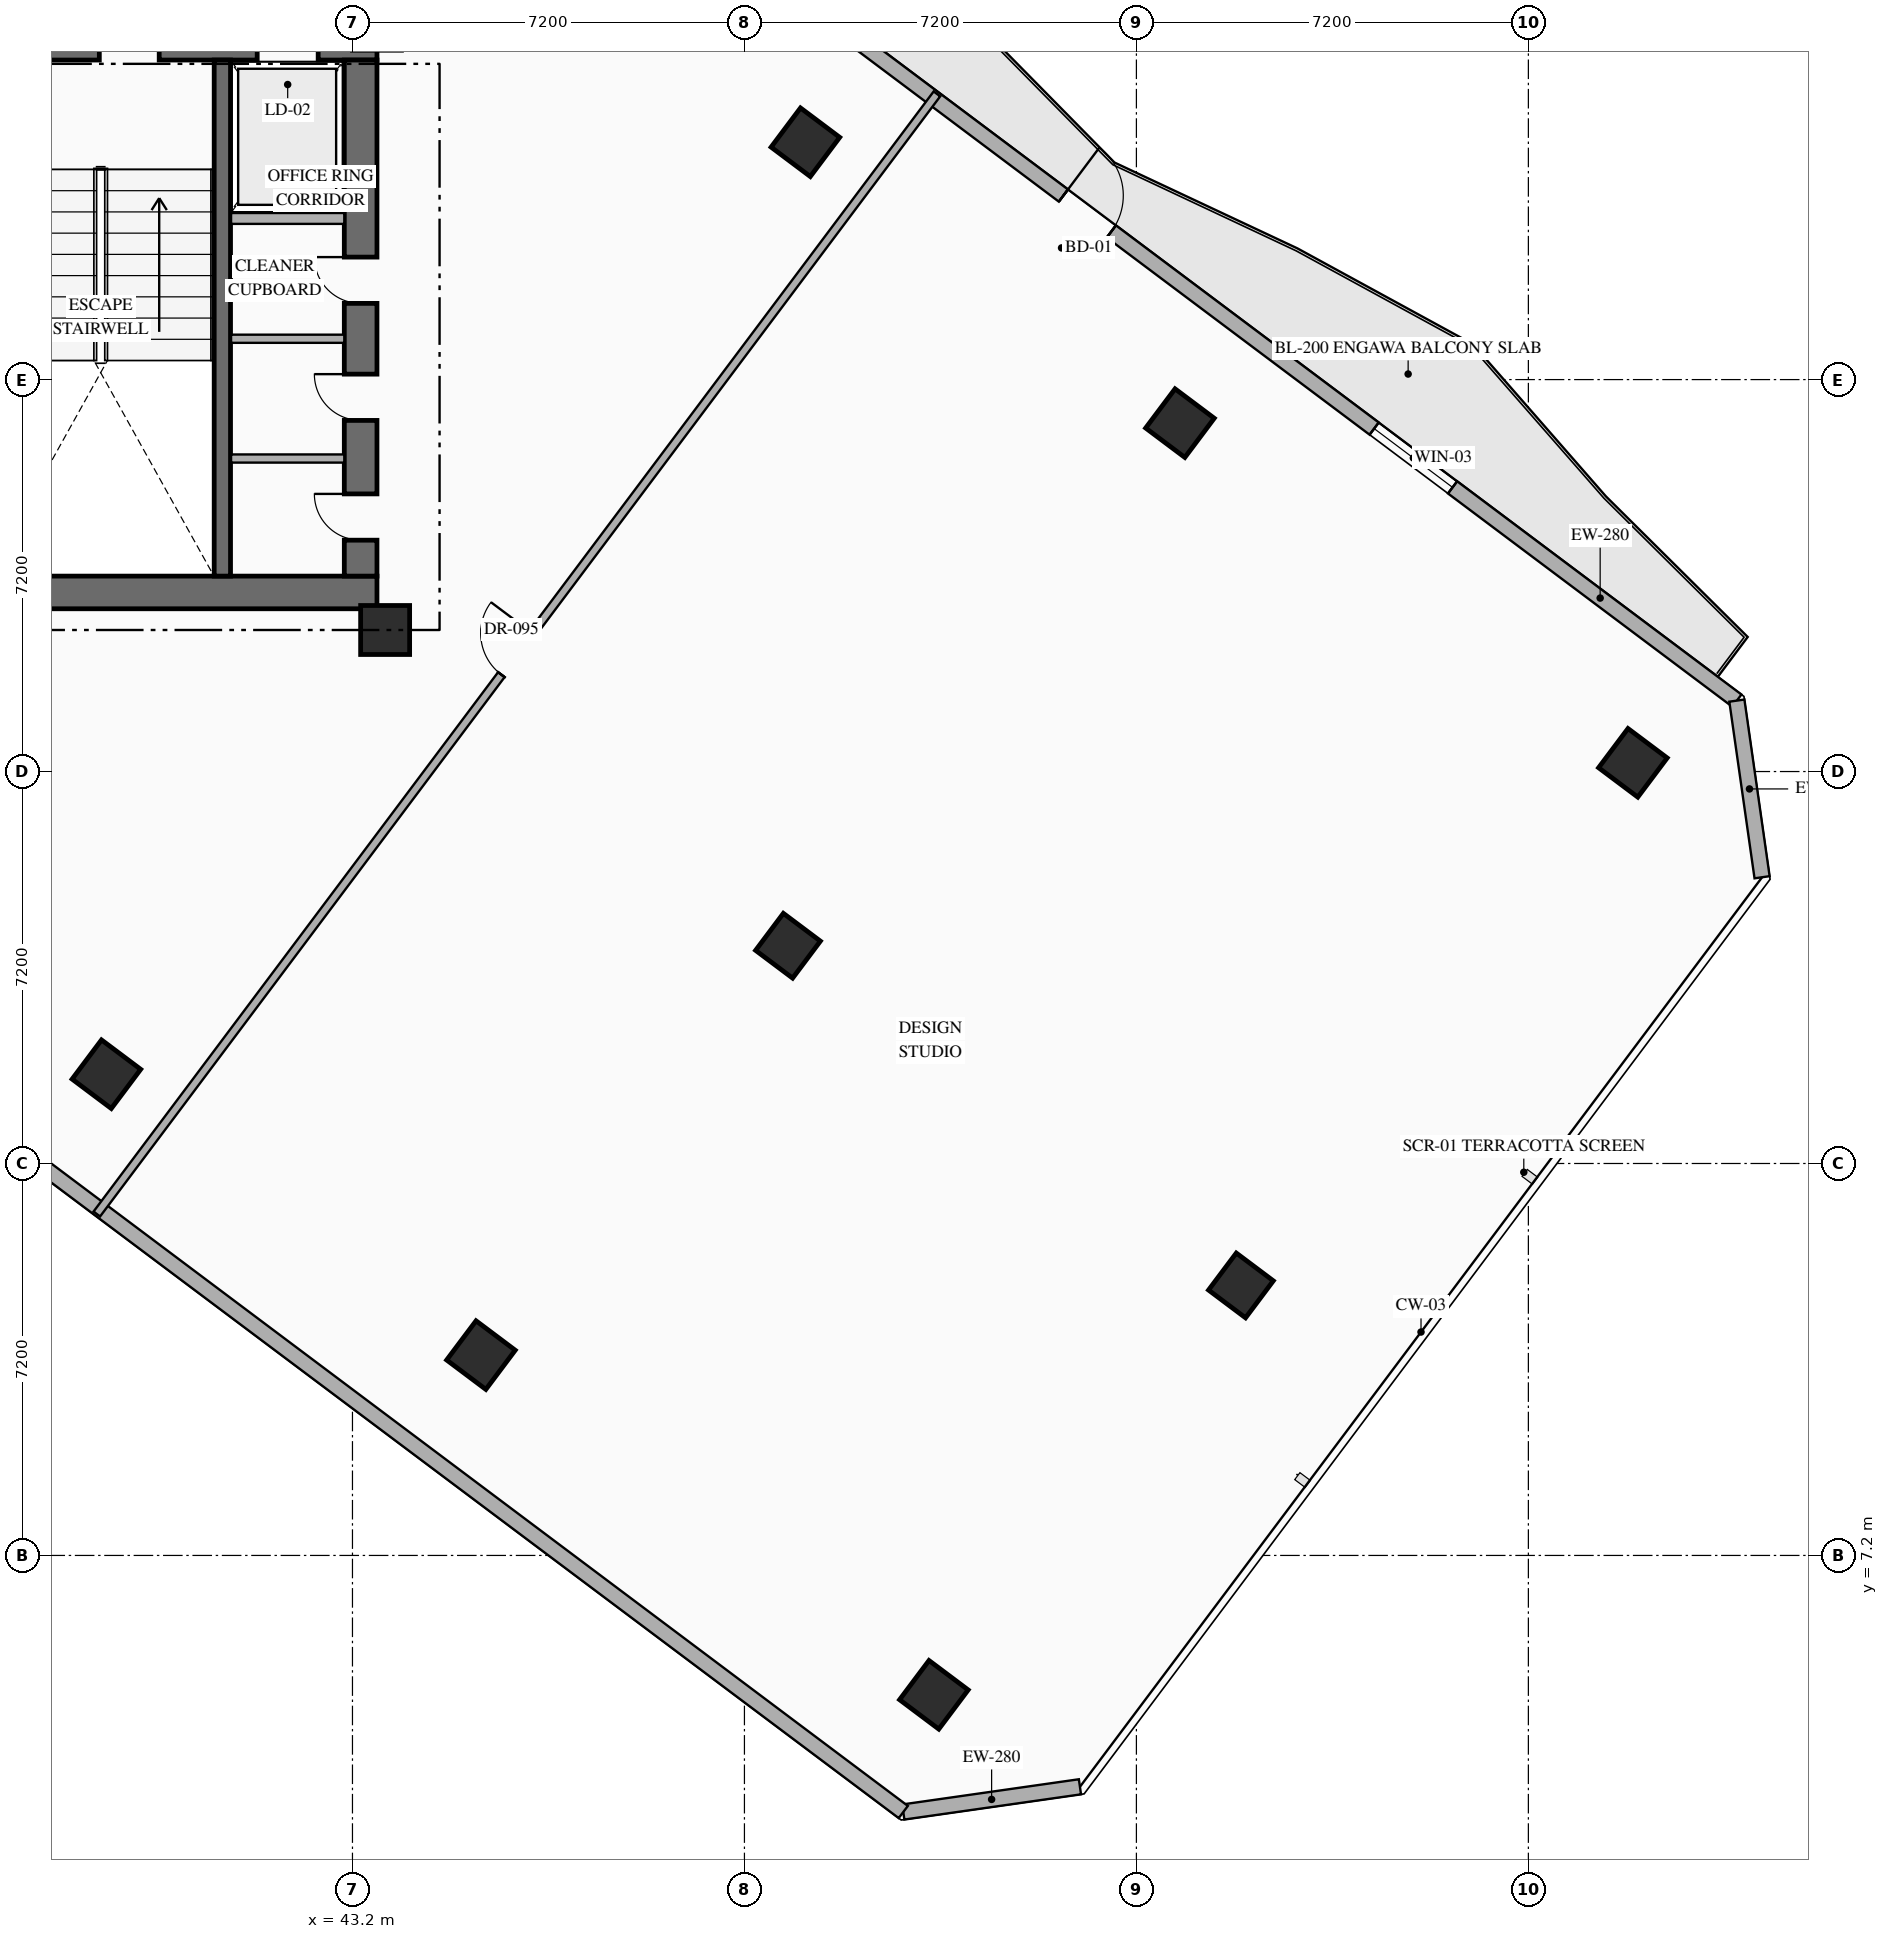
"""IFC4 building model, lengths in metres.
Left out: names, types, materials, properties, quantities, classifications, styles, units other than length and angle.
Written with IfcOpenShell. Run it as: python <this file> out.ifc"""

import sys

from ifc_helpers import new_model, si_unit, direction, frame, frame_2d, origin, origin_2d, place, context, subcontext, project, spatial, rectangle, hollow_rectangle, extrude, element, fill, save


model = new_model("IFC4")
c1 = context("Model", 3, precision=1e-05, world=origin(), true_north=direction((0.0, 1.0)))
c2 = subcontext(c1, "Body", "Model", "MODEL_VIEW")
j1 = project(units=[si_unit("LENGTHUNIT", "METRE"), si_unit("PLANEANGLEUNIT", "RADIAN")], contexts=[c1])
p1 = place(None, origin())
s1 = spatial("IfcSite", under=j1, at=p1, CompositionType="ELEMENT")
p2 = place(p1, origin())
s2 = spatial("IfcBuilding", under=s1, at=p2, CompositionType="ELEMENT")
p3 = place(p2, frame((0.0, 0.0, 115.65)))
s3 = spatial("IfcBuildingStorey", under=s2, at=p3, CompositionType="ELEMENT", Elevation=115.65)
p4 = place(p3, frame((35.89, 24.89, 0.0), z_axis=(0.0, 0.0, 1.0), x_axis=(1.0, 0.0, 0.0)))
e1 = element("IfcWall", 1, at=p4, inside=s3, PredefinedType="SHEAR", context=c2, shape_type="SweptSolid", body=[
    extrude(rectangle(XDim=7.76, YDim=0.6, at=frame_2d((3.88, 0.0))), origin(), (0.0, 0.0, 1.0), 3.6),
])
p5 = place(p3, frame((35.89, 34.97, 0.0), z_axis=(0.0, 0.0, 1.0), x_axis=(1.0, 0.0, 0.0)))
e2 = element("IfcWall", 2, at=p5, inside=s3, PredefinedType="SHEAR", context=c2, shape_type="SweptSolid", body=[
    extrude(rectangle(XDim=7.76, YDim=0.6, at=frame_2d((3.88, 0.0))), origin(), (0.0, 0.0, 1.0), 3.6),
])
p6 = place(p5, frame((2.66, 0.0, 0.0)))
e3 = element("IfcOpeningElement", 3, at=p6, cuts=e2, PredefinedType="OPENING", context=c2, shape_type="SweptSolid", body=[
    extrude(rectangle(XDim=1.1, YDim=2.2, at=frame_2d((0.55, 1.1))), frame((0.0, 0.31, 0.0), z_axis=(0.0, -1.0, 0.0), x_axis=(1.0, 0.0, 0.0)), (0.0, 0.0, 1.0), 0.62),
])
p7 = place(p5, frame((5.56, 0.0, 0.0)))
e4 = element("IfcOpeningElement", 4, at=p7, cuts=e2, PredefinedType="OPENING", context=c2, shape_type="SweptSolid", body=[
    extrude(rectangle(XDim=1.12, YDim=2.15, at=frame_2d((0.56, 1.075))), frame((0.0, 0.31, 0.0), z_axis=(0.0, -1.0, 0.0), x_axis=(1.0, 0.0, 0.0)), (0.0, 0.0, 1.0), 0.62),
])
p8 = place(p3, frame((43.35, 25.19, 0.0), z_axis=(0.0, 0.0, 1.0), x_axis=(0.0, 1.0, 0.0)))
e5 = element("IfcWall", 5, at=p8, inside=s3, PredefinedType="SHEAR", context=c2, shape_type="SweptSolid", body=[
    extrude(rectangle(XDim=9.48, YDim=0.6, at=frame_2d((4.74, 0.0))), origin(), (0.0, 0.0, 1.0), 3.6),
])
p9 = place(p8, frame((0.66, 0.0, 0.0)))
e6 = element("IfcOpeningElement", 6, at=p9, cuts=e5, PredefinedType="OPENING", context=c2, shape_type="SweptSolid", body=[
    extrude(rectangle(XDim=0.85, YDim=2.08, at=frame_2d((0.425, 1.04))), frame((0.0, 0.31, 0.0), z_axis=(0.0, -1.0, 0.0), x_axis=(1.0, 0.0, 0.0)), (0.0, 0.0, 1.0), 0.62),
])
p10 = place(p8, frame((2.86, 0.0, 0.0)))
e7 = element("IfcOpeningElement", 7, at=p10, cuts=e5, PredefinedType="OPENING", context=c2, shape_type="SweptSolid", body=[
    extrude(rectangle(XDim=0.85, YDim=2.08, at=frame_2d((0.425, 1.04))), frame((0.0, 0.31, 0.0), z_axis=(0.0, -1.0, 0.0), x_axis=(1.0, 0.0, 0.0)), (0.0, 0.0, 1.0), 0.62),
])
p11 = place(p8, frame((5.01, 0.0, 0.0)))
e8 = element("IfcOpeningElement", 8, at=p11, cuts=e5, PredefinedType="OPENING", context=c2, shape_type="SweptSolid", body=[
    extrude(rectangle(XDim=0.85, YDim=2.08, at=frame_2d((0.425, 1.04))), frame((0.0, 0.31, 0.0), z_axis=(0.0, -1.0, 0.0), x_axis=(1.0, 0.0, 0.0)), (0.0, 0.0, 1.0), 0.62),
])
p12 = place(p3, frame((40.81, 25.19, 0.0), z_axis=(0.0, 0.0, 1.0), x_axis=(0.0, 1.0, 0.0)))
e9 = element("IfcWall", 9, at=p12, inside=s3, PredefinedType="SHEAR", context=c2, shape_type="SweptSolid", body=[
    extrude(rectangle(XDim=9.48, YDim=0.3, at=frame_2d((4.74, 0.0))), origin(), (0.0, 0.0, 1.0), 3.6),
])
p13 = place(p3, frame((43.8, 24.2, 0.0), z_axis=(0.0, 0.0, 1.0), x_axis=(1.0, 0.0, 0.0)))
e10 = element("IfcColumn", 10, at=p13, inside=s3, PredefinedType="COLUMN", context=c2, shape_type="SweptSolid", body=[
    extrude(rectangle(XDim=0.9, YDim=0.9, at=origin_2d()), origin(), (0.0, 0.0, 1.0), 3.6),
])
for number, where, z_axis, x_axis in (
    (11, (38.68, 16.04, 0.0), (0.0, 0.0, 1.0), (0.8, -0.6, 0.0)),
    (12, (51.52, 33.16, 0.0), (0.0, 0.0, 1.0), (0.8, -0.6, 0.0)),
    (13, (45.56, 10.88, 0.0), (0.0, 0.0, 1.0), (0.8, -0.6, 0.0)),
    (14, (58.4, 28.0, 0.0), (0.0, 0.0, 1.0), (0.8, -0.6, 0.0)),
):
    element("IfcColumn", number, at=place(p3, frame(where, z_axis=z_axis, x_axis=x_axis)), inside=s3, PredefinedType="COLUMN", context=c2, shape_type="SweptSolid", body=[
        extrude(hollow_rectangle(XDim=0.9, YDim=0.9, WallThickness=0.036, at=origin_2d()), origin(), (0.0, 0.0, 1.0), 3.6),
    ])
p14 = place(p3, frame((51.2, 18.4, 0.0), z_axis=(0.0, 0.0, 1.0), x_axis=(0.799999996291, -0.600000004945, 0.0)))
e15 = element("IfcColumn", 15, at=p14, inside=s3, PredefinedType="COLUMN", context=c2, shape_type="SweptSolid", body=[
    extrude(hollow_rectangle(XDim=0.85, YDim=0.85, WallThickness=0.032, at=origin_2d()), origin(), (0.0, 0.0, 1.0), 3.6),
])
for number, where, z_axis, x_axis in (
    (16, (53.88, 4.64, 0.0), (0.0, 0.0, 1.0), (0.8, -0.6, 0.0)),
    (17, (66.72, 21.76, 0.0), (0.0, 0.0, 1.0), (0.8, -0.6, 0.0)),
):
    element("IfcColumn", number, at=place(p3, frame(where, z_axis=z_axis, x_axis=x_axis)), inside=s3, PredefinedType="COLUMN", context=c2, shape_type="SweptSolid", body=[
        extrude(hollow_rectangle(XDim=0.9, YDim=0.9, WallThickness=0.036, at=origin_2d()), origin(), (0.0, 0.0, 1.0), 3.6),
    ])
p15 = place(p3, frame((59.52, 12.16, 0.0), z_axis=(0.0, 0.0, 1.0), x_axis=(0.799999996291, -0.600000004945, 0.0)))
e18 = element("IfcColumn", 18, at=p15, inside=s3, PredefinedType="COLUMN", context=c2, shape_type="SweptSolid", body=[
    extrude(hollow_rectangle(XDim=0.85, YDim=0.85, WallThickness=0.032, at=origin_2d()), origin(), (0.0, 0.0, 1.0), 3.6),
])
p16 = place(p3, frame((44.86, 40.73, 0.0), z_axis=(0.0, 0.0, 1.0), x_axis=(0.800006902154, -0.599990797017, 0.0)))
e19 = element("IfcWall", 19, at=p16, inside=s3, PredefinedType="STANDARD", context=c2, shape_type="SweptSolid", body=[
    extrude(rectangle(XDim=29.712, YDim=0.28, at=frame_2d((14.856, 0.0))), origin(), (0.0, 0.0, 1.0), 3.35),
])
p17 = place(p16, frame((14.249, 0.0, 0.0)))
e20 = element("IfcOpeningElement", 20, at=p17, cuts=e19, PredefinedType="OPENING", context=c2, shape_type="SweptSolid", body=[
    extrude(rectangle(XDim=1.1, YDim=2.2, at=frame_2d((0.55, 1.1))), frame((0.0, 0.15, 0.0), z_axis=(0.0, -1.0, 0.0), x_axis=(1.0, 0.0, 0.0)), (0.0, 0.0, 1.0), 0.3),
])
p18 = place(p16, frame((6.528, 0.0, 0.85)))
e21 = element("IfcOpeningElement", 21, at=p18, cuts=e19, PredefinedType="OPENING", context=c2, shape_type="SweptSolid", body=[
    extrude(rectangle(XDim=1.8, YDim=2.1, at=frame_2d((0.9, 1.05))), frame((0.0, 0.15, 0.0), z_axis=(0.0, -1.0, 0.0), x_axis=(1.0, 0.0, 0.0)), (0.0, 0.0, 1.0), 0.3),
])
p19 = place(p16, frame((21.384, 0.0, 0.85)))
e22 = element("IfcOpeningElement", 22, at=p19, cuts=e19, PredefinedType="OPENING", context=c2, shape_type="SweptSolid", body=[
    extrude(rectangle(XDim=1.8, YDim=2.1, at=frame_2d((0.9, 1.05))), frame((0.0, 0.15, 0.0), z_axis=(0.0, -1.0, 0.0), x_axis=(1.0, 0.0, 0.0)), (0.0, 0.0, 1.0), 0.3),
])
p20 = place(p3, frame((68.63, 22.903, 0.0), z_axis=(0.0, 0.0, 1.0), x_axis=(0.141285803956, -0.989968848803, 0.0)))
e23 = element("IfcWall", 23, at=p20, inside=s3, PredefinedType="STANDARD", context=c2, shape_type="SweptSolid", body=[
    extrude(rectangle(XDim=3.278, YDim=0.28, at=frame_2d((1.639, 0.0))), origin(), (0.0, 0.0, 1.0), 3.35),
])
p21 = place(p3, frame((56.563, 2.95, 0.0), z_axis=(0.0, 0.0, 1.0), x_axis=(-0.989977778067, -0.141223223777, 0.0)))
e24 = element("IfcWall", 24, at=p21, inside=s3, PredefinedType="STANDARD", context=c2, shape_type="SweptSolid", body=[
    extrude(rectangle(XDim=3.278, YDim=0.28, at=frame_2d((1.639, 0.0))), origin(), (0.0, 0.0, 1.0), 3.35),
])
p22 = place(p3, frame((53.318, 2.487, 0.0), z_axis=(0.0, 0.0, 1.0), x_axis=(-0.800004174678, 0.599994433723, 0.0)))
e25 = element("IfcWall", 25, at=p22, inside=s3, PredefinedType="STANDARD", context=c2, shape_type="SweptSolid", body=[
    extrude(rectangle(XDim=35.089, YDim=0.28, at=frame_2d((17.544, 0.0))), origin(), (0.0, 0.0, 1.0), 3.35),
])
p23 = place(p3, frame((40.97, 31.76, 0.0), z_axis=(0.0, 0.0, 1.0), x_axis=(1.0, 0.0, 0.0)))
e26 = element("IfcWall", 26, at=p23, inside=s3, PredefinedType="STANDARD", context=c2, shape_type="SweptSolid", body=[
    extrude(rectangle(XDim=2.08, YDim=0.2, at=frame_2d((1.04, 0.0))), origin(), (0.0, 0.0, 1.0), 3.35),
])
for number, where, z_axis, x_axis in (
    (27, (40.97, 27.35, 0.0), (0.0, 0.0, 1.0), (1.0, 0.0, 0.0)),
    (28, (40.97, 29.55, 0.0), (0.0, 0.0, 1.0), (1.0, 0.0, 0.0)),
):
    element("IfcWall", number, at=place(p3, frame(where, z_axis=z_axis, x_axis=x_axis)), inside=s3, PredefinedType="PARTITIONING", context=c2, shape_type="SweptSolid", body=[
        extrude(rectangle(XDim=2.08, YDim=0.15, at=frame_2d((1.04, 0.0))), origin(), (0.0, 0.0, 1.0), 3.35),
    ])
p24 = place(p3, frame((38.504, 13.472, 0.0), z_axis=(0.0, 0.0, 1.0), x_axis=(0.6, 0.8, 0.0)))
e29 = element("IfcWall", 29, at=p24, inside=s3, PredefinedType="PARTITIONING", context=c2, shape_type="SweptSolid", body=[
    extrude(rectangle(XDim=25.72, YDim=0.15, at=frame_2d((12.86, 0.0))), origin(), (0.0, 0.0, 1.0), 3.35),
])
p25 = place(p24, frame((12.385, 0.0, 0.0)))
e30 = element("IfcOpeningElement", 30, at=p25, cuts=e29, PredefinedType="OPENING", context=c2, shape_type="SweptSolid", body=[
    extrude(rectangle(XDim=0.95, YDim=2.15, at=frame_2d((0.475, 1.075))), frame((0.0, 0.085, 0.0), z_axis=(0.0, -1.0, 0.0), x_axis=(1.0, 0.0, 0.0)), (0.0, 0.0, 1.0), 0.17),
])
p26 = place(p17, origin())
e31 = element("IfcDoor", 31, at=p26, inside=s3, OperationType="SINGLE_SWING_LEFT", PredefinedType="DOOR", context=c2, shape_type="SweptSolid", body=[
    extrude(rectangle(XDim=1.1, YDim=2.2, at=frame_2d((0.55, 1.1))), frame((0.0, 0.025, 0.0), z_axis=(0.0, -1.0, 0.0), x_axis=(1.0, 0.0, 0.0)), (0.0, 0.0, 1.0), 0.05),
])
fill(e20, e31)
p27 = place(p19, origin())
e32 = element("IfcWindow", 32, at=p27, inside=s3, PartitioningType="SINGLE_PANEL", PredefinedType="WINDOW", context=c2, shape_type="SweptSolid", body=[
    extrude(rectangle(XDim=1.8, YDim=2.1, at=frame_2d((0.9, 1.05))), frame((0.0, 0.03, 0.0), z_axis=(0.0, -1.0, 0.0), x_axis=(1.0, 0.0, 0.0)), (0.0, 0.0, 1.0), 0.06),
])
fill(e22, e32)
p28 = place(p9, origin())
e33 = element("IfcDoor", 33, at=p28, inside=s3, OperationType="SINGLE_SWING_RIGHT", PredefinedType="DOOR", context=c2, shape_type="SweptSolid", body=[
    extrude(rectangle(XDim=0.85, YDim=2.08, at=frame_2d((0.425, 1.04))), frame((0.0, 0.025, 0.0), z_axis=(0.0, -1.0, 0.0), x_axis=(1.0, 0.0, 0.0)), (0.0, 0.0, 1.0), 0.05),
])
fill(e6, e33)
p29 = place(p10, origin())
e34 = element("IfcDoor", 34, at=p29, inside=s3, OperationType="SINGLE_SWING_RIGHT", PredefinedType="DOOR", context=c2, shape_type="SweptSolid", body=[
    extrude(rectangle(XDim=0.85, YDim=2.08, at=frame_2d((0.425, 1.04))), frame((0.0, 0.025, 0.0), z_axis=(0.0, -1.0, 0.0), x_axis=(1.0, 0.0, 0.0)), (0.0, 0.0, 1.0), 0.05),
])
fill(e7, e34)
p30 = place(p11, origin())
e35 = element("IfcDoor", 35, at=p30, inside=s3, OperationType="SINGLE_SWING_RIGHT", PredefinedType="DOOR", context=c2, shape_type="SweptSolid", body=[
    extrude(rectangle(XDim=0.85, YDim=2.08, at=frame_2d((0.425, 1.04))), frame((0.0, 0.025, 0.0), z_axis=(0.0, -1.0, 0.0), x_axis=(1.0, 0.0, 0.0)), (0.0, 0.0, 1.0), 0.05),
])
fill(e8, e35)
p31 = place(p25, origin())
e36 = element("IfcDoor", 36, at=p31, inside=s3, OperationType="SINGLE_SWING_RIGHT", PredefinedType="DOOR", context=c2, shape_type="SweptSolid", body=[
    extrude(rectangle(XDim=0.95, YDim=2.15, at=frame_2d((0.475, 1.075))), frame((0.0, 0.025, 0.0), z_axis=(0.0, -1.0, 0.0), x_axis=(1.0, 0.0, 0.0)), (0.0, 0.0, 1.0), 0.05),
])
fill(e30, e36)
save(model, sys.argv[1])
